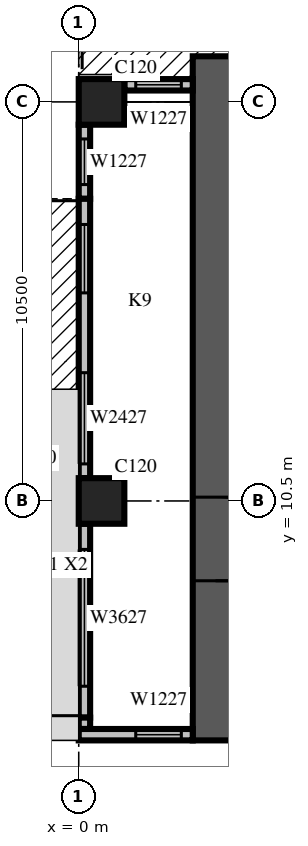
"""IFC4 building model, lengths in metres.
Left out: names, types, materials, properties, quantities, classifications, styles, units other than length and angle.
Written with IfcOpenShell. Run it as: python <this file> out.ifc"""

import sys

from ifc_helpers import new_model, si_unit, direction, frame, frame_2d, origin, origin_2d, place, context, subcontext, project, spatial, rectangle, extrude, source, transform, mapped, element, fill, save


model = new_model("IFC4")
c1 = context("Model", 3, precision=1e-05, world=origin(), true_north=direction((0.0, 1.0)))
c2 = subcontext(c1, "Body", "Model", "MODEL_VIEW")
j1 = project(units=[si_unit("LENGTHUNIT", "METRE"), si_unit("PLANEANGLEUNIT", "RADIAN")], contexts=[c1])
p1 = place(None, origin())
s1 = spatial("IfcSite", under=j1, at=p1, CompositionType="ELEMENT")
p2 = place(p1, origin())
s2 = spatial("IfcBuilding", under=s1, at=p2, CompositionType="ELEMENT")
p3 = place(p2, frame((0.0, 0.0, 69.9)))
s3 = spatial("IfcBuildingStorey", under=s2, at=p3, CompositionType="ELEMENT", Elevation=69.9)
m1 = source(origin(), c2, "Body", "SweptSolid", [
    extrude(rectangle(XDim=1.2, YDim=1.2, at=origin_2d()), origin(), (0.0, 0.0, 1.0), 4.2),
])
for number, where, z_axis, x_axis in (
    (1, (0.6, 10.5, 0.0), (0.0, 0.0, 1.0), (1.0, 0.0, 0.0)),
    (2, (0.6, 21.0, 0.0), (0.0, 0.0, 1.0), (1.0, 0.0, 0.0)),
):
    element("IfcColumn", number, at=place(p3, frame(where, z_axis=z_axis, x_axis=x_axis)), inside=s3, PredefinedType="COLUMN", context=c2, shape_type="MappedRepresentation", body=[
        mapped(m1, transform((0.0, 0.0, 0.0), scale=1.0)),
    ])
m2 = source(origin(), c2, "Body", "SweptSolid", [
    extrude(rectangle(XDim=18.0, YDim=1.2, at=frame_2d((9.0, 0.0))), origin(), (0.0, 0.0, 1.0), 4.2),
])
p4 = place(p3, frame((3.6, 4.2, 0.0), z_axis=(0.0, 0.0, 1.0), x_axis=(0.0, 1.0, 0.0)))
e3 = element("IfcWall", 3, at=p4, inside=s3, PredefinedType="SHEAR", context=c2, shape_type="MappedRepresentation", body=[
    mapped(m2, transform((0.0, 0.0, 0.0), scale=1.0)),
])
m3 = source(origin(), c2, "Body", "SweptSolid", [
    extrude(rectangle(XDim=2.2, YDim=2.1, at=frame_2d((1.1, 1.05))), frame((0.0, 0.61, 0.0), z_axis=(0.0, -1.0, 0.0), x_axis=(1.0, 0.0, 0.0)), (0.0, 0.0, 1.0), 1.22),
])
p5 = place(p4, frame((4.2, 0.0, 0.0)))
e4 = element("IfcOpeningElement", 4, at=p5, cuts=e3, PredefinedType="OPENING", context=c2, shape_type="MappedRepresentation", body=[
    mapped(m3, transform((0.0, 0.0, 0.0), scale=1.0)),
])
m4 = source(origin(), c2, "Body", "SweptSolid", [
    extrude(rectangle(XDim=1.8, YDim=0.3, at=frame_2d((0.9, 0.0))), origin(), (0.0, 0.0, 1.0), 3.8),
])
p6 = place(p3, frame((3.0, 21.45, 0.0), z_axis=(0.0, 0.0, 1.0), x_axis=(-1.0, 0.0, 0.0)))
e5 = element("IfcWall", 5, at=p6, inside=s3, PredefinedType="STANDARD", context=c2, shape_type="MappedRepresentation", body=[
    mapped(m4, transform((0.0, 0.0, 0.0), scale=1.0)),
])
m5 = source(origin(), c2, "Body", "SweptSolid", [
    extrude(rectangle(XDim=1.2, YDim=2.7, at=frame_2d((0.6, 1.35))), frame((0.0, 0.16, 0.0), z_axis=(0.0, -1.0, 0.0), x_axis=(1.0, 0.0, 0.0)), (0.0, 0.0, 1.0), 0.32),
])
p7 = place(p6, frame((0.3, 0.0, 0.6)))
e6 = element("IfcOpeningElement", 6, at=p7, cuts=e5, PredefinedType="OPENING", context=c2, shape_type="MappedRepresentation", body=[
    mapped(m5, transform((0.0, 0.0, 0.0), scale=1.0)),
])
p8 = place(p3, frame((0.15, 20.4, 0.0), z_axis=(0.0, 0.0, 1.0), x_axis=(0.0, -1.0, 0.0)))
e7 = element("IfcWall", 7, at=p8, inside=s3, PredefinedType="STANDARD", context=c2, shape_type="SweptSolid", body=[
    extrude(rectangle(XDim=1.95, YDim=0.3, at=frame_2d((0.975, 0.0))), origin(), (0.0, 0.0, 1.0), 3.8),
])
p9 = place(p8, frame((0.375, 0.0, 0.6)))
e8 = element("IfcOpeningElement", 8, at=p9, cuts=e7, PredefinedType="OPENING", context=c2, shape_type="MappedRepresentation", body=[
    mapped(m5, transform((0.0, 0.0, 0.0), scale=1.0)),
])
p10 = place(p3, frame((0.15, 18.45, 0.0), z_axis=(0.0, 0.0, 1.0), x_axis=(0.0, -1.0, 0.0)))
e9 = element("IfcWall", 9, at=p10, inside=s3, PredefinedType="STANDARD", context=c2, shape_type="SweptSolid", body=[
    extrude(rectangle(XDim=7.35, YDim=0.3, at=frame_2d((3.675, 0.0))), origin(), (0.0, 0.0, 1.0), 3.8),
])
m6 = source(origin(), c2, "Body", "SweptSolid", [
    extrude(rectangle(XDim=1.8, YDim=2.4, at=frame_2d((0.9, 1.2))), frame((0.0, 0.16, 0.0), z_axis=(0.0, -1.0, 0.0), x_axis=(1.0, 0.0, 0.0)), (0.0, 0.0, 1.0), 0.32),
])
p11 = place(p10, frame((0.675, 0.0, 0.0)))
e10 = element("IfcOpeningElement", 10, at=p11, cuts=e9, PredefinedType="OPENING", context=c2, shape_type="MappedRepresentation", body=[
    mapped(m6, transform((0.0, 0.0, 0.0), scale=1.0)),
])
m7 = source(origin(), c2, "Body", "SweptSolid", [
    extrude(rectangle(XDim=2.4, YDim=2.7, at=frame_2d((1.2, 1.35))), frame((0.0, 0.16, 0.0), z_axis=(0.0, -1.0, 0.0), x_axis=(1.0, 0.0, 0.0)), (0.0, 0.0, 1.0), 0.32),
])
p12 = place(p10, frame((4.575, 0.0, 0.6)))
e11 = element("IfcOpeningElement", 11, at=p12, cuts=e9, PredefinedType="OPENING", context=c2, shape_type="MappedRepresentation", body=[
    mapped(m7, transform((0.0, 0.0, 0.0), scale=1.0)),
])
p13 = place(p3, frame((0.15, 9.9, 0.0), z_axis=(0.0, 0.0, 1.0), x_axis=(0.0, -1.0, 0.0)))
e12 = element("IfcWall", 12, at=p13, inside=s3, PredefinedType="STANDARD", context=c2, shape_type="SweptSolid", body=[
    extrude(rectangle(XDim=5.1, YDim=0.3, at=frame_2d((2.55, 0.0))), origin(), (0.0, 0.0, 1.0), 3.8),
])
m8 = source(origin(), c2, "Body", "SweptSolid", [
    extrude(rectangle(XDim=3.6, YDim=2.7, at=frame_2d((1.8, 1.35))), frame((0.0, 0.16, 0.0), z_axis=(0.0, -1.0, 0.0), x_axis=(1.0, 0.0, 0.0)), (0.0, 0.0, 1.0), 0.32),
])
p14 = place(p13, frame((0.675, 0.0, 0.6)))
e13 = element("IfcOpeningElement", 13, at=p14, cuts=e12, PredefinedType="OPENING", context=c2, shape_type="MappedRepresentation", body=[
    mapped(m8, transform((0.0, 0.0, 0.0), scale=1.0)),
])
p15 = place(p3, frame((0.15, 4.8, 0.0), z_axis=(0.0, 0.0, 1.0), x_axis=(0.0, -1.0, 0.0)))
e14 = element("IfcWall", 14, at=p15, inside=s3, PredefinedType="STANDARD", context=c2, shape_type="SweptSolid", body=[
    extrude(rectangle(XDim=0.3, YDim=0.3, at=frame_2d((0.15, 0.0))), origin(), (0.0, 0.0, 1.0), 3.8),
])
m9 = source(origin(), c2, "Body", "SweptSolid", [
    extrude(rectangle(XDim=3.0, YDim=0.3, at=frame_2d((1.5, 0.0))), origin(), (0.0, 0.0, 1.0), 3.8),
])
p16 = place(p3, frame((0.0, 4.35, 0.0), z_axis=(0.0, 0.0, 1.0), x_axis=(1.0, 0.0, 0.0)))
e15 = element("IfcWall", 15, at=p16, inside=s3, PredefinedType="STANDARD", context=c2, shape_type="MappedRepresentation", body=[
    mapped(m9, transform((0.0, 0.0, 0.0), scale=1.0)),
])
p17 = place(p16, frame((1.5, 0.0, 0.6)))
e16 = element("IfcOpeningElement", 16, at=p17, cuts=e15, PredefinedType="OPENING", context=c2, shape_type="MappedRepresentation", body=[
    mapped(m5, transform((0.0, 0.0, 0.0), scale=1.0)),
])
m10 = source(origin(), c2, "Body", "SweptSolid", [
    extrude(rectangle(XDim=1.2, YDim=2.7, at=frame_2d((0.6, 1.35))), frame((0.0, 0.03, 0.0), z_axis=(0.0, -1.0, 0.0), x_axis=(1.0, 0.0, 0.0)), (0.0, 0.0, 1.0), 0.06),
])
p18 = place(p7, origin())
e17 = element("IfcWindow", 17, at=p18, inside=s3, PartitioningType="SINGLE_PANEL", PredefinedType="WINDOW", context=c2, shape_type="MappedRepresentation", body=[
    mapped(m10, transform((0.0, 0.0, 0.0), scale=1.0)),
])
fill(e6, e17)
p19 = place(p9, origin())
e18 = element("IfcWindow", 18, at=p19, inside=s3, PartitioningType="SINGLE_PANEL", PredefinedType="WINDOW", context=c2, shape_type="MappedRepresentation", body=[
    mapped(m10, transform((0.0, 0.0, 0.0), scale=1.0)),
])
fill(e8, e18)
m11 = source(origin(), c2, "Body", "SweptSolid", [
    extrude(rectangle(XDim=1.8, YDim=2.4, at=frame_2d((0.9, 1.2))), frame((0.0, 0.025, 0.0), z_axis=(0.0, -1.0, 0.0), x_axis=(1.0, 0.0, 0.0)), (0.0, 0.0, 1.0), 0.05),
])
p20 = place(p11, origin())
e19 = element("IfcDoor", 19, at=p20, inside=s3, OperationType="SLIDING_TO_LEFT", PredefinedType="DOOR", context=c2, shape_type="MappedRepresentation", body=[
    mapped(m11, transform((0.0, 0.0, 0.0), scale=1.0)),
])
fill(e10, e19)
m12 = source(origin(), c2, "Body", "SweptSolid", [
    extrude(rectangle(XDim=2.4, YDim=2.7, at=frame_2d((1.2, 1.35))), frame((0.0, 0.03, 0.0), z_axis=(0.0, -1.0, 0.0), x_axis=(1.0, 0.0, 0.0)), (0.0, 0.0, 1.0), 0.06),
])
p21 = place(p12, origin())
e20 = element("IfcWindow", 20, at=p21, inside=s3, PartitioningType="SINGLE_PANEL", PredefinedType="WINDOW", context=c2, shape_type="MappedRepresentation", body=[
    mapped(m12, transform((0.0, 0.0, 0.0), scale=1.0)),
])
fill(e11, e20)
m13 = source(origin(), c2, "Body", "SweptSolid", [
    extrude(rectangle(XDim=3.6, YDim=2.7, at=frame_2d((1.8, 1.35))), frame((0.0, 0.03, 0.0), z_axis=(0.0, -1.0, 0.0), x_axis=(1.0, 0.0, 0.0)), (0.0, 0.0, 1.0), 0.06),
])
p22 = place(p14, origin())
e21 = element("IfcWindow", 21, at=p22, inside=s3, PartitioningType="SINGLE_PANEL", PredefinedType="WINDOW", context=c2, shape_type="MappedRepresentation", body=[
    mapped(m13, transform((0.0, 0.0, 0.0), scale=1.0)),
])
fill(e13, e21)
p23 = place(p17, origin())
e22 = element("IfcWindow", 22, at=p23, inside=s3, PartitioningType="SINGLE_PANEL", PredefinedType="WINDOW", context=c2, shape_type="MappedRepresentation", body=[
    mapped(m10, transform((0.0, 0.0, 0.0), scale=1.0)),
])
fill(e16, e22)
m14 = source(origin(), c2, "Body", "SweptSolid", [
    extrude(rectangle(XDim=2.2, YDim=2.1, at=frame_2d((1.1, 1.05))), frame((0.0, 0.025, 0.0), z_axis=(0.0, -1.0, 0.0), x_axis=(1.0, 0.0, 0.0)), (0.0, 0.0, 1.0), 0.05),
])
p24 = place(p5, origin())
e23 = element("IfcDoor", 23, at=p24, inside=s3, OperationType="DOUBLE_DOOR_SINGLE_SWING", PredefinedType="DOOR", context=c2, shape_type="MappedRepresentation", body=[
    mapped(m14, transform((0.0, 0.0, 0.0), scale=1.0)),
])
fill(e4, e23)
save(model, sys.argv[1])
